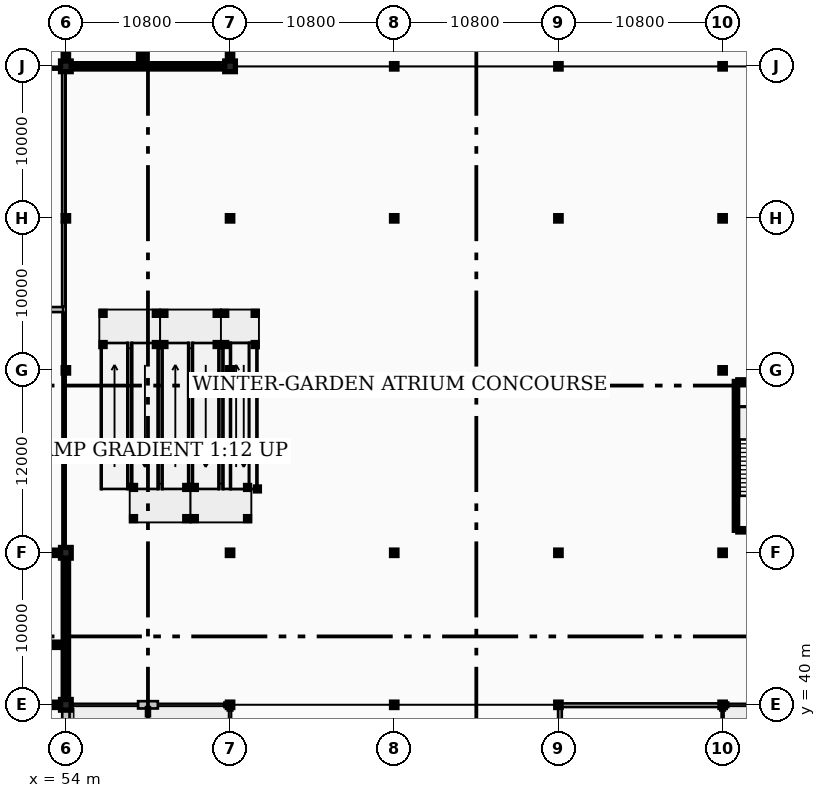
"""IFC4 building model, lengths in metres.
Left out: names, types, materials, properties, quantities, classifications, styles, units other than length and angle.
Written with IfcOpenShell. Run it as: python <this file> out.ifc"""

import sys

from ifc_helpers import new_model, si_unit, direction, frame, frame_2d, origin, origin_2d, place, context, subcontext, project, spatial, rectangle, hollow_circle, i_section, extrude, element, save


model = new_model("IFC4")
c1 = context("Model", 3, precision=1e-05, world=origin(), true_north=direction((0.0, 1.0)))
c2 = subcontext(c1, "Body", "Model", "MODEL_VIEW")
j1 = project(units=[si_unit("LENGTHUNIT", "METRE"), si_unit("PLANEANGLEUNIT", "RADIAN")], contexts=[c1])
p1 = place(None, origin())
s1 = spatial("IfcSite", under=j1, at=p1, CompositionType="ELEMENT")
p2 = place(p1, origin())
s2 = spatial("IfcBuilding", under=s1, at=p2, CompositionType="ELEMENT")
p3 = place(p2, origin())
s3 = spatial("IfcBuildingStorey", under=s2, at=p3, CompositionType="ELEMENT", Elevation=0.0)
for number, where, z_axis, x_axis in (
    (1, (54.0, 40.0, 0.0), (0.0, 0.0, 1.0), (1.0, 0.0, 0.0)),
    (2, (54.0, 50.0, 0.0), (0.0, 0.0, 1.0), (1.0, 0.0, 0.0)),
):
    element("IfcColumn", number, at=place(p3, frame(where, z_axis=z_axis, x_axis=x_axis)), inside=s3, PredefinedType="COLUMN", context=c2, shape_type="SweptSolid", body=[
        extrude(rectangle(XDim=0.7, YDim=0.7, at=origin_2d()), origin(), (0.0, 0.0, 1.0), 4.8),
    ])
for number, where, z_axis, x_axis in (
    (3, (54.0, 62.0, 0.0), (0.0, 0.0, 1.0), (1.0, 0.0, 0.0)),
    (4, (54.0, 72.0, 0.0), (0.0, 0.0, 1.0), (1.0, 0.0, 0.0)),
):
    element("IfcColumn", number, at=place(p3, frame(where, z_axis=z_axis, x_axis=x_axis)), inside=s3, PredefinedType="COLUMN", context=c2, shape_type="SweptSolid", body=[
        extrude(hollow_circle(Radius=0.178, WallThickness=0.016, at=origin_2d()), origin(), (0.0, 0.0, 1.0), 4.8),
    ])
p4 = place(p3, frame((54.0, 82.0, 0.0), z_axis=(0.0, 0.0, 1.0), x_axis=(1.0, 0.0, 0.0)))
e5 = element("IfcColumn", 5, at=p4, inside=s3, PredefinedType="COLUMN", context=c2, shape_type="SweptSolid", body=[
    extrude(rectangle(XDim=0.7, YDim=0.7, at=origin_2d()), origin(), (0.0, 0.0, 1.0), 4.8),
])
for number, where, z_axis, x_axis in (
    (6, (64.8, 40.0, 0.0), (0.0, 0.0, 1.0), (1.0, 0.0, 0.0)),
    (7, (64.8, 50.0, 0.0), (0.0, 0.0, 1.0), (1.0, 0.0, 0.0)),
    (8, (64.8, 62.0, 0.0), (0.0, 0.0, 1.0), (1.0, 0.0, 0.0)),
    (9, (64.8, 72.0, 0.0), (0.0, 0.0, 1.0), (1.0, 0.0, 0.0)),
):
    element("IfcColumn", number, at=place(p3, frame(where, z_axis=z_axis, x_axis=x_axis)), inside=s3, PredefinedType="COLUMN", context=c2, shape_type="SweptSolid", body=[
        extrude(hollow_circle(Radius=0.178, WallThickness=0.016, at=origin_2d()), origin(), (0.0, 0.0, 1.0), 4.8),
    ])
p5 = place(p3, frame((64.8, 82.0, 0.0), z_axis=(0.0, 0.0, 1.0), x_axis=(1.0, 0.0, 0.0)))
e10 = element("IfcColumn", 10, at=p5, inside=s3, PredefinedType="COLUMN", context=c2, shape_type="SweptSolid", body=[
    extrude(rectangle(XDim=0.7, YDim=0.7, at=origin_2d()), origin(), (0.0, 0.0, 1.0), 4.8),
])
for number, where, z_axis, x_axis in (
    (11, (75.6, 40.0, 0.0), (0.0, 0.0, 1.0), (1.0, 0.0, 0.0)),
    (12, (75.6, 50.0, 0.0), (0.0, 0.0, 1.0), (1.0, 0.0, 0.0)),
    (13, (75.6, 72.0, 0.0), (0.0, 0.0, 1.0), (1.0, 0.0, 0.0)),
    (14, (75.6, 82.0, 0.0), (0.0, 0.0, 1.0), (1.0, 0.0, 0.0)),
    (15, (86.4, 40.0, 0.0), (0.0, 0.0, 1.0), (1.0, 0.0, 0.0)),
    (16, (86.4, 50.0, 0.0), (0.0, 0.0, 1.0), (1.0, 0.0, 0.0)),
    (17, (86.4, 72.0, 0.0), (0.0, 0.0, 1.0), (1.0, 0.0, 0.0)),
    (18, (86.4, 82.0, 0.0), (0.0, 0.0, 1.0), (1.0, 0.0, 0.0)),
    (19, (97.2, 40.0, 0.0), (0.0, 0.0, 1.0), (1.0, 0.0, 0.0)),
    (20, (97.2, 50.0, 0.0), (0.0, 0.0, 1.0), (1.0, 0.0, 0.0)),
    (21, (97.2, 62.0, 0.0), (0.0, 0.0, 1.0), (1.0, 0.0, 0.0)),
    (22, (97.2, 72.0, 0.0), (0.0, 0.0, 1.0), (1.0, 0.0, 0.0)),
    (23, (97.2, 82.0, 0.0), (0.0, 0.0, 1.0), (1.0, 0.0, 0.0)),
):
    element("IfcColumn", number, at=place(p3, frame(where, z_axis=z_axis, x_axis=x_axis)), inside=s3, PredefinedType="COLUMN", context=c2, shape_type="SweptSolid", body=[
        extrude(hollow_circle(Radius=0.178, WallThickness=0.016, at=origin_2d()), origin(), (0.0, 0.0, 1.0), 4.8),
    ])
p6 = place(p3, frame((54.0, 30.145, 0.0), z_axis=(0.0, 0.0, 1.0), x_axis=(0.0, 1.0, 0.0)))
e24 = element("IfcWall", 24, at=p6, inside=s3, PredefinedType="STANDARD", context=c2, shape_type="SweptSolid", body=[
    extrude(rectangle(XDim=9.71, YDim=0.48, at=frame_2d((4.855, 0.0))), origin(), (0.0, 0.0, 1.0), 4.56),
])
p7 = place(p6, frame((2.755, 0.0, 0.9)))
e25 = element("IfcOpeningElement", 25, at=p7, cuts=e24, PredefinedType="OPENING", context=c2, shape_type="SweptSolid", body=[
    extrude(rectangle(XDim=4.2, YDim=2.7, at=frame_2d((2.1, 1.35))), frame((0.0, 0.25, 0.0), z_axis=(0.0, -1.0, 0.0), x_axis=(1.0, 0.0, 0.0)), (0.0, 0.0, 1.0), 0.5),
])
p8 = place(p3, frame((58.75, 40.0, 0.0), z_axis=(0.0, 0.0, 1.0), x_axis=(1.0, 0.0, 0.0)))
e26 = element("IfcWall", 26, at=p8, inside=s3, PredefinedType="STANDARD", context=c2, shape_type="SweptSolid", body=[
    extrude(rectangle(XDim=1.3, YDim=0.48, at=frame_2d((0.65, 0.0))), origin(), (0.0, 0.0, 1.0), 4.009),
])
for number, where, z_axis, x_axis in (
    (27, (54.145, 40.0, 0.0), (0.0, 0.0, 1.0), (1.0, 0.0, 0.0)),
    (28, (64.43, 40.0, 0.0), (0.0, 0.0, 1.0), (1.0, 0.0, 0.0)),
    (29, (64.8, 39.855, 0.0), (0.0, 0.0, 1.0), (0.0, -1.0, 0.0)),
    (30, (97.2, 39.63, 0.0), (0.0, 0.0, 1.0), (0.0, 1.0, 0.0)),
    (31, (97.345, 40.0, 0.0), (0.0, 0.0, 1.0), (1.0, 0.0, 0.0)),
):
    element("IfcWall", number, at=place(p3, frame(where, z_axis=z_axis, x_axis=x_axis)), inside=s3, PredefinedType="STANDARD", context=c2, shape_type="SweptSolid", body=[
        extrude(rectangle(XDim=0.225, YDim=0.3, at=frame_2d((0.113, 0.0))), origin(), (0.0, 0.0, 1.0), 4.56),
    ])
p9 = place(p3, frame((54.35, 82.0, 0.0), z_axis=(0.0, 0.0, 1.0), x_axis=(1.0, 0.0, 0.0)))
e32 = element("IfcWall", 32, at=p9, inside=s3, PredefinedType="SHEAR", context=c2, shape_type="SweptSolid", body=[
    extrude(rectangle(XDim=10.1, YDim=0.35, at=frame_2d((5.05, 0.0))), origin(), (0.0, 0.0, 1.0), 4.56),
])
p10 = place(p3, frame((54.0, 82.35, 0.0), z_axis=(0.0, 0.0, 1.0), x_axis=(0.0, 1.0, 0.0)))
e33 = element("IfcWall", 33, at=p10, inside=s3, PredefinedType="SHEAR", context=c2, shape_type="SweptSolid", body=[
    extrude(rectangle(XDim=9.3, YDim=0.35, at=frame_2d((4.65, 0.0))), origin(), (0.0, 0.0, 1.0), 4.56),
])
p11 = place(p10, frame((1.1, 0.0, 0.0)))
e34 = element("IfcOpeningElement", 34, at=p11, cuts=e33, PredefinedType="OPENING", context=c2, shape_type="SweptSolid", body=[
    extrude(rectangle(XDim=1.1, YDim=2.2, at=frame_2d((0.55, 1.1))), frame((0.0, 0.185, 0.0), z_axis=(0.0, -1.0, 0.0), x_axis=(1.0, 0.0, 0.0)), (0.0, 0.0, 1.0), 0.37),
])
p12 = place(p3, frame((64.8, 82.35, 0.0), z_axis=(0.0, 0.0, 1.0), x_axis=(0.0, 1.0, 0.0)))
e35 = element("IfcWall", 35, at=p12, inside=s3, PredefinedType="SHEAR", context=c2, shape_type="SweptSolid", body=[
    extrude(rectangle(XDim=9.3, YDim=0.35, at=frame_2d((4.65, 0.0))), origin(), (0.0, 0.0, 1.0), 4.56),
])
p13 = place(p12, frame((0.83, 0.0, 0.0)))
e36 = element("IfcOpeningElement", 36, at=p13, cuts=e35, PredefinedType="OPENING", context=c2, shape_type="SweptSolid", body=[
    extrude(rectangle(XDim=1.8, YDim=2.25, at=frame_2d((0.9, 1.125))), frame((0.0, 0.185, 0.0), z_axis=(0.0, -1.0, 0.0), x_axis=(1.0, 0.0, 0.0)), (0.0, 0.0, 1.0), 0.37),
])
p14 = place(p3, frame((58.95, 82.175, 0.0), z_axis=(0.0, 0.0, 1.0), x_axis=(0.0, 1.0, 0.0)))
e37 = element("IfcWall", 37, at=p14, inside=s3, PredefinedType="SHEAR", context=c2, shape_type="SweptSolid", body=[
    extrude(rectangle(XDim=9.65, YDim=0.35, at=frame_2d((4.825, 0.0))), origin(), (0.0, 0.0, 1.0), 4.56),
])
p15 = place(p14, frame((0.9, 0.0, 0.0)))
e38 = element("IfcOpeningElement", 38, at=p15, cuts=e37, PredefinedType="OPENING", context=c2, shape_type="SweptSolid", body=[
    extrude(rectangle(XDim=1.1, YDim=2.2, at=frame_2d((0.55, 1.1))), frame((0.0, 0.185, 0.0), z_axis=(0.0, -1.0, 0.0), x_axis=(1.0, 0.0, 0.0)), (0.0, 0.0, 1.0), 0.37),
])
p16 = place(p3, frame((43.55, 40.0, 0.0), z_axis=(0.0, 0.0, 1.0), x_axis=(1.0, 0.0, 0.0)))
e39 = element("IfcWall", 39, at=p16, inside=s3, PredefinedType="SHEAR", context=c2, shape_type="SweptSolid", body=[
    extrude(rectangle(XDim=10.1, YDim=0.35, at=frame_2d((5.05, 0.0))), origin(), (0.0, 0.0, 1.0), 4.56),
])
p17 = place(p16, frame((6.21, 0.0, 0.0)))
e40 = element("IfcOpeningElement", 40, at=p17, cuts=e39, PredefinedType="OPENING", context=c2, shape_type="SweptSolid", body=[
    extrude(rectangle(XDim=1.8, YDim=2.25, at=frame_2d((0.9, 1.125))), frame((0.0, 0.185, 0.0), z_axis=(0.0, -1.0, 0.0), x_axis=(1.0, 0.0, 0.0)), (0.0, 0.0, 1.0), 0.37),
])
p18 = place(p3, frame((43.55, 50.0, 0.0), z_axis=(0.0, 0.0, 1.0), x_axis=(1.0, 0.0, 0.0)))
e41 = element("IfcWall", 41, at=p18, inside=s3, PredefinedType="SHEAR", context=c2, shape_type="SweptSolid", body=[
    extrude(rectangle(XDim=10.1, YDim=0.35, at=frame_2d((5.05, 0.0))), origin(), (0.0, 0.0, 1.0), 4.56),
])
p19 = place(p18, frame((1.3, 0.0, 0.0)))
e42 = element("IfcOpeningElement", 42, at=p19, cuts=e41, PredefinedType="OPENING", context=c2, shape_type="SweptSolid", body=[
    extrude(rectangle(XDim=1.6, YDim=2.2, at=frame_2d((0.8, 1.1))), frame((0.0, 0.185, 0.0), z_axis=(0.0, -1.0, 0.0), x_axis=(1.0, 0.0, 0.0)), (0.0, 0.0, 1.0), 0.37),
])
p20 = place(p3, frame((54.0, 40.35, 0.0), z_axis=(0.0, 0.0, 1.0), x_axis=(0.0, 1.0, 0.0)))
e43 = element("IfcWall", 43, at=p20, inside=s3, PredefinedType="SHEAR", context=c2, shape_type="SweptSolid", body=[
    extrude(rectangle(XDim=9.3, YDim=0.35, at=frame_2d((4.65, 0.0))), origin(), (0.0, 0.0, 1.0), 4.56),
])
p21 = place(p3, frame((48.33, 43.95, 0.0), z_axis=(0.0, 0.0, 1.0), x_axis=(1.0, 0.0, 0.0)))
e44 = element("IfcWall", 44, at=p21, inside=s3, PredefinedType="SHEAR", context=c2, shape_type="SweptSolid", body=[
    extrude(rectangle(XDim=5.49, YDim=0.35, at=frame_2d((2.745, 0.0))), origin(), (0.0, 0.0, 1.0), 4.56),
])
p22 = place(p21, frame((2.1, 0.0, 0.0)))
e45 = element("IfcOpeningElement", 45, at=p22, cuts=e44, PredefinedType="OPENING", context=c2, shape_type="SweptSolid", body=[
    extrude(rectangle(XDim=1.1, YDim=2.2, at=frame_2d((0.55, 1.1))), frame((0.0, 0.185, 0.0), z_axis=(0.0, -1.0, 0.0), x_axis=(1.0, 0.0, 0.0)), (0.0, 0.0, 1.0), 0.37),
])
p23 = place(p3, frame((98.08, 51.48, 0.0), z_axis=(0.0, 0.0, 1.0), x_axis=(0.0, 1.0, 0.0)))
e46 = element("IfcWall", 46, at=p23, inside=s3, PredefinedType="SHEAR", context=c2, shape_type="SweptSolid", body=[
    extrude(rectangle(XDim=9.79, YDim=0.22, at=frame_2d((4.895, 0.0))), origin(), (0.0, 0.0, 1.0), 4.56),
])
p24 = place(p3, frame((98.2, 61.27, 0.0), z_axis=(0.0, 0.0, 1.0), x_axis=(1.0, 0.0, 0.0)))
e47 = element("IfcWall", 47, at=p24, inside=s3, PredefinedType="SHEAR", context=c2, shape_type="SweptSolid", body=[
    extrude(rectangle(XDim=4.4, YDim=0.22, at=frame_2d((2.2, 0.0))), origin(), (0.0, 0.0, 1.0), 4.56),
])
p25 = place(p3, frame((98.2, 51.48, 0.0), z_axis=(0.0, 0.0, 1.0), x_axis=(1.0, 0.0, 0.0)))
e48 = element("IfcWall", 48, at=p25, inside=s3, PredefinedType="SHEAR", context=c2, shape_type="SweptSolid", body=[
    extrude(rectangle(XDim=4.4, YDim=0.22, at=frame_2d((2.2, 0.0))), origin(), (0.0, 0.0, 1.0), 4.56),
])
p26 = place(p25, frame((1.65, 0.0, 0.0)))
e49 = element("IfcOpeningElement", 49, at=p26, cuts=e48, PredefinedType="OPENING", context=c2, shape_type="SweptSolid", body=[
    extrude(rectangle(XDim=1.1, YDim=2.2, at=frame_2d((0.55, 1.1))), frame((0.0, 0.12, 0.0), z_axis=(0.0, -1.0, 0.0), x_axis=(1.0, 0.0, 0.0)), (0.0, 0.0, 1.0), 0.24),
])
for number, where, z_axis, x_axis in (
    (50, (56.45, 63.7, 0.0), (0.0, 0.0, 1.0), (1.0, 0.0, 0.0)),
    (51, (56.45, 65.75, 0.0), (0.0, 0.0, 1.0), (1.0, 0.0, 0.0)),
    (52, (59.95, 63.7, 0.0), (0.0, 0.0, 1.0), (1.0, 0.0, 0.0)),
    (53, (59.95, 65.75, 0.0), (0.0, 0.0, 1.0), (1.0, 0.0, 0.0)),
):
    element("IfcColumn", number, at=place(p3, frame(where, z_axis=z_axis, x_axis=x_axis)), inside=s3, PredefinedType="COLUMN", context=c2, shape_type="SweptSolid", body=[
        extrude(i_section(OverallWidth=0.26, OverallDepth=0.26, WebThickness=0.01, FlangeThickness=0.018, FilletRadius=0.024, at=origin_2d()), origin(), (0.0, 0.0, 1.0), 0.6),
    ])
for number, where, z_axis, x_axis in (
    (54, (58.45, 52.25, 0.0), (0.0, 0.0, 1.0), (1.0, 0.0, 0.0)),
    (55, (58.45, 54.3, 0.0), (0.0, 0.0, 1.0), (1.0, 0.0, 0.0)),
    (56, (61.95, 52.25, 0.0), (0.0, 0.0, 1.0), (1.0, 0.0, 0.0)),
    (57, (61.95, 54.3, 0.0), (0.0, 0.0, 1.0), (1.0, 0.0, 0.0)),
):
    element("IfcColumn", number, at=place(p3, frame(where, z_axis=z_axis, x_axis=x_axis)), inside=s3, PredefinedType="COLUMN", context=c2, shape_type="SweptSolid", body=[
        extrude(i_section(OverallWidth=0.26, OverallDepth=0.26, WebThickness=0.01, FlangeThickness=0.018, FilletRadius=0.024, at=origin_2d()), origin(), (0.0, 0.0, 1.0), 1.4),
    ])
for number, where, z_axis, x_axis in (
    (58, (60.45, 63.7, 0.0), (0.0, 0.0, 1.0), (1.0, 0.0, 0.0)),
    (59, (60.45, 65.75, 0.0), (0.0, 0.0, 1.0), (1.0, 0.0, 0.0)),
    (60, (63.95, 63.7, 0.0), (0.0, 0.0, 1.0), (1.0, 0.0, 0.0)),
    (61, (63.95, 65.75, 0.0), (0.0, 0.0, 1.0), (1.0, 0.0, 0.0)),
):
    element("IfcColumn", number, at=place(p3, frame(where, z_axis=z_axis, x_axis=x_axis)), inside=s3, PredefinedType="COLUMN", context=c2, shape_type="SweptSolid", body=[
        extrude(i_section(OverallWidth=0.26, OverallDepth=0.26, WebThickness=0.01, FlangeThickness=0.018, FilletRadius=0.024, at=origin_2d()), origin(), (0.0, 0.0, 1.0), 2.2),
    ])
for number, where, z_axis, x_axis in (
    (62, (62.45, 52.25, 0.0), (0.0, 0.0, 1.0), (1.0, 0.0, 0.0)),
    (63, (62.45, 54.3, 0.0), (0.0, 0.0, 1.0), (1.0, 0.0, 0.0)),
    (64, (65.95, 52.25, 0.0), (0.0, 0.0, 1.0), (1.0, 0.0, 0.0)),
    (65, (65.95, 54.3, 0.0), (0.0, 0.0, 1.0), (1.0, 0.0, 0.0)),
):
    element("IfcColumn", number, at=place(p3, frame(where, z_axis=z_axis, x_axis=x_axis)), inside=s3, PredefinedType="COLUMN", context=c2, shape_type="SweptSolid", body=[
        extrude(i_section(OverallWidth=0.26, OverallDepth=0.26, WebThickness=0.01, FlangeThickness=0.018, FilletRadius=0.024, at=origin_2d()), origin(), (0.0, 0.0, 1.0), 3.0),
    ])
for number, where, z_axis, x_axis in (
    (66, (64.45, 63.7, 0.0), (0.0, 0.0, 1.0), (1.0, 0.0, 0.0)),
    (67, (64.45, 65.75, 0.0), (0.0, 0.0, 1.0), (1.0, 0.0, 0.0)),
    (68, (66.45, 63.7, 0.0), (0.0, 0.0, 1.0), (1.0, 0.0, 0.0)),
    (69, (66.45, 65.75, 0.0), (0.0, 0.0, 1.0), (1.0, 0.0, 0.0)),
):
    element("IfcColumn", number, at=place(p3, frame(where, z_axis=z_axis, x_axis=x_axis)), inside=s3, PredefinedType="COLUMN", context=c2, shape_type="SweptSolid", body=[
        extrude(i_section(OverallWidth=0.26, OverallDepth=0.26, WebThickness=0.01, FlangeThickness=0.018, FilletRadius=0.024, at=origin_2d()), origin(), (0.0, 0.0, 1.0), 3.8),
    ])
p27 = place(p3, frame((66.6, 54.2, 0.0), z_axis=(0.0, 0.0, 1.0), x_axis=(1.0, 0.0, 0.0)))
e70 = element("IfcColumn", 70, at=p27, inside=s3, PredefinedType="COLUMN", context=c2, shape_type="SweptSolid", body=[
    extrude(i_section(OverallWidth=0.26, OverallDepth=0.26, WebThickness=0.01, FlangeThickness=0.018, FilletRadius=0.024, at=origin_2d()), origin(), (0.0, 0.0, 1.0), 4.56),
])
p28 = place(p3, frame((43.38, 81.85, 0.0), z_axis=(0.0, 0.0, 1.0), x_axis=(1.0, 0.0, 0.0)))
e71 = element("IfcWall", 71, at=p28, inside=s3, PredefinedType="PARTITIONING", context=c2, shape_type="SweptSolid", body=[
    extrude(rectangle(XDim=10.44, YDim=0.13, at=frame_2d((5.22, 0.0))), origin(), (0.0, 0.0, 1.0), 3.989),
])
p29 = place(p28, frame((4.395, 0.0, 0.0)))
e72 = element("IfcOpeningElement", 72, at=p29, cuts=e71, PredefinedType="OPENING", context=c2, shape_type="SweptSolid", body=[
    extrude(rectangle(XDim=1.65, YDim=2.4, at=frame_2d((0.825, 1.2))), frame((0.0, 0.075, 0.0), z_axis=(0.0, -1.0, 0.0), x_axis=(1.0, 0.0, 0.0)), (0.0, 0.0, 1.0), 0.15),
])
p30 = place(p3, frame((86.5, 30.2, 0.0), z_axis=(0.0, 0.0, 1.0), x_axis=(0.0, 1.0, 0.0)))
e73 = element("IfcWall", 73, at=p30, inside=s3, PredefinedType="SOLIDWALL", context=c2, shape_type="SweptSolid", body=[
    extrude(rectangle(XDim=9.62, YDim=0.24, at=frame_2d((4.81, 0.0))), origin(), (0.0, 0.0, 1.0), 4.52),
])
p31 = place(p30, frame((4.06, 0.0, 0.0)))
e74 = element("IfcOpeningElement", 74, at=p31, cuts=e73, PredefinedType="OPENING", context=c2, shape_type="SweptSolid", body=[
    extrude(rectangle(XDim=1.5, YDim=2.3, at=frame_2d((0.75, 1.15))), frame((0.0, 0.13, 0.0), z_axis=(0.0, -1.0, 0.0), x_axis=(1.0, 0.0, 0.0)), (0.0, 0.0, 1.0), 0.26),
])
p32 = place(p3, frame((86.6, 39.975, 0.0), z_axis=(0.0, 0.0, 1.0), x_axis=(1.0, 0.0, 0.0)))
e75 = element("IfcWall", 75, at=p32, inside=s3, PredefinedType="SOLIDWALL", context=c2, shape_type="SweptSolid", body=[
    extrude(rectangle(XDim=10.42, YDim=0.24, at=frame_2d((5.21, 0.0))), origin(), (0.0, 0.0, 1.0), 4.009),
])
p33 = place(p3, frame((43.38, 66.0, 0.0), z_axis=(0.0, 0.0, 1.0), x_axis=(1.0, 0.0, 0.0)))
e76 = element("IfcWall", 76, at=p33, inside=s3, PredefinedType="PARTITIONING", context=c2, shape_type="SweptSolid", body=[
    extrude(rectangle(XDim=10.44, YDim=0.33, at=frame_2d((5.22, 0.0))), origin(), (0.0, 0.0, 1.0), 4.52),
])
p34 = place(p3, frame((53.86, 50.18, 0.0), z_axis=(0.0, 0.0, 1.0), x_axis=(0.0, 1.0, 0.0)))
e77 = element("IfcWall", 77, at=p34, inside=s3, PredefinedType="PARTITIONING", context=c2, shape_type="SweptSolid", body=[
    extrude(rectangle(XDim=11.62, YDim=0.17, at=frame_2d((5.81, 0.0))), origin(), (0.0, 0.0, 1.0), 4.52),
])
p35 = place(p3, frame((53.86, 62.2, 0.0), z_axis=(0.0, 0.0, 1.0), x_axis=(0.0, 1.0, 0.0)))
e78 = element("IfcWall", 78, at=p35, inside=s3, PredefinedType="PARTITIONING", context=c2, shape_type="SweptSolid", body=[
    extrude(rectangle(XDim=3.6, YDim=0.17, at=frame_2d((1.8, 0.0))), origin(), (0.0, 0.0, 1.0), 4.52),
])
p36 = place(p3, frame((53.86, 66.2, 0.0), z_axis=(0.0, 0.0, 1.0), x_axis=(0.0, 1.0, 0.0)))
e79 = element("IfcWall", 79, at=p36, inside=s3, PredefinedType="PARTITIONING", context=c2, shape_type="SweptSolid", body=[
    extrude(rectangle(XDim=5.6, YDim=0.21, at=frame_2d((2.8, 0.0))), origin(), (0.0, 0.0, 1.0), 4.52),
])
p37 = place(p3, frame((53.86, 72.2, 0.0), z_axis=(0.0, 0.0, 1.0), x_axis=(0.0, 1.0, 0.0)))
e80 = element("IfcWall", 80, at=p37, inside=s3, PredefinedType="PARTITIONING", context=c2, shape_type="SweptSolid", body=[
    extrude(rectangle(XDim=9.62, YDim=0.21, at=frame_2d((4.81, 0.0))), origin(), (0.0, 0.0, 1.0), 4.52),
])
save(model, sys.argv[1])
